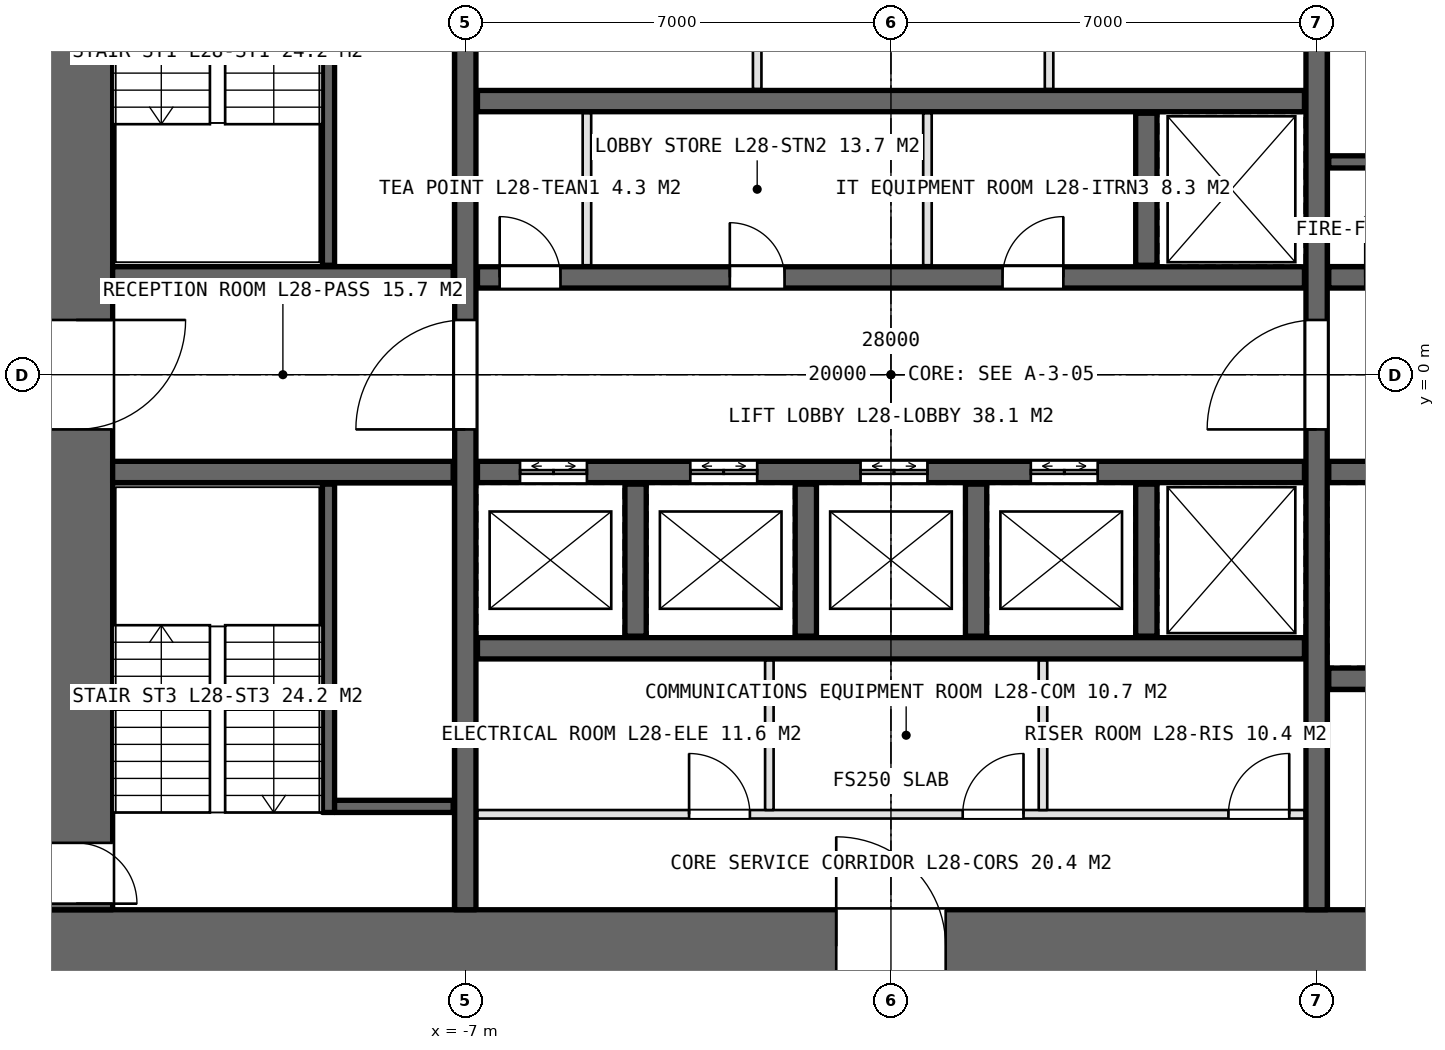
"""IFC4 building model, lengths in metres.
Left out: names, types, materials, properties, quantities, classifications, styles, units other than length and angle.
Written with IfcOpenShell. Run it as: python <this file> out.ifc"""

import sys

from ifc_helpers import new_model, si_unit, direction, frame, frame_2d, origin, place, context, subcontext, project, spatial, rectangle, extrude, element, fill, save


model = new_model("IFC4")
c1 = context("Model", 3, precision=1e-05, world=origin(), true_north=direction((0.0, 1.0)))
c2 = subcontext(c1, "Body", "Model", "MODEL_VIEW")
j1 = project(units=[si_unit("LENGTHUNIT", "METRE"), si_unit("PLANEANGLEUNIT", "RADIAN")], contexts=[c1])
p1 = place(None, origin())
s1 = spatial("IfcSite", under=j1, at=p1, CompositionType="ELEMENT")
p2 = place(p1, origin())
s2 = spatial("IfcBuilding", under=s1, at=p2, CompositionType="ELEMENT")
p3 = place(p2, frame((0.0, 0.0, 134.4)))
s3 = spatial("IfcBuildingStorey", under=s2, at=p3, CompositionType="ELEMENT", Elevation=134.4)
p4 = place(p3, frame((-14.0, -9.4, 0.0), z_axis=(0.0, 0.0, 1.0), x_axis=(1.0, 0.0, 0.0)))
e1 = element("IfcWall", 1, at=p4, inside=s3, PredefinedType="SHEAR", context=c2, shape_type="SweptSolid", body=[
    extrude(rectangle(XDim=28.0, YDim=1.2, at=frame_2d((14.0, 0.0))), origin(), (0.0, 0.0, 1.0), 4.2),
])
p5 = place(p4, frame((13.1, 0.0, 0.0)))
e2 = element("IfcOpeningElement", 2, at=p5, cuts=e1, PredefinedType="OPENING", context=c2, shape_type="SweptSolid", body=[
    extrude(rectangle(XDim=1.8, YDim=2.4, at=frame_2d((0.9, 1.2))), frame((0.0, 0.61, 0.0), z_axis=(0.0, -1.0, 0.0), x_axis=(1.0, 0.0, 0.0)), (0.0, 0.0, 1.0), 1.22),
])
p6 = place(p4, frame((22.9, 0.0, 0.0)))
e3 = element("IfcOpeningElement", 3, at=p6, cuts=e1, PredefinedType="OPENING", context=c2, shape_type="SweptSolid", body=[
    extrude(rectangle(XDim=2.2, YDim=2.7, at=frame_2d((1.1, 1.35))), frame((0.0, 0.61, 0.0), z_axis=(0.0, -1.0, 0.0), x_axis=(1.0, 0.0, 0.0)), (0.0, 0.0, 1.0), 1.22),
])
p7 = place(p3, frame((-13.4, 8.8, 0.0), z_axis=(0.0, 0.0, 1.0), x_axis=(0.0, -1.0, 0.0)))
e4 = element("IfcWall", 4, at=p7, inside=s3, PredefinedType="SHEAR", context=c2, shape_type="SweptSolid", body=[
    extrude(rectangle(XDim=17.6, YDim=1.2, at=frame_2d((8.8, 0.0))), origin(), (0.0, 0.0, 1.0), 4.2),
])
p8 = place(p7, frame((7.9, 0.0, 0.0)))
e5 = element("IfcOpeningElement", 5, at=p8, cuts=e4, PredefinedType="OPENING", context=c2, shape_type="SweptSolid", body=[
    extrude(rectangle(XDim=1.8, YDim=2.4, at=frame_2d((0.9, 1.2))), frame((0.0, 0.61, 0.0), z_axis=(0.0, -1.0, 0.0), x_axis=(1.0, 0.0, 0.0)), (0.0, 0.0, 1.0), 1.22),
])
p9 = place(p7, frame((16.5, 0.0, 0.0)))
e6 = element("IfcOpeningElement", 6, at=p9, cuts=e4, PredefinedType="OPENING", context=c2, shape_type="SweptSolid", body=[
    extrude(rectangle(XDim=1.0, YDim=2.4, at=frame_2d((0.5, 1.2))), frame((0.0, 0.61, 0.0), z_axis=(0.0, -1.0, 0.0), x_axis=(1.0, 0.0, 0.0)), (0.0, 0.0, 1.0), 1.22),
])
p10 = place(p3, frame((-7.0, -8.8, 0.0), z_axis=(0.0, 0.0, 1.0), x_axis=(0.0, 1.0, 0.0)))
e7 = element("IfcWall", 7, at=p10, inside=s3, PredefinedType="SHEAR", context=c2, shape_type="SweptSolid", body=[
    extrude(rectangle(XDim=17.6, YDim=0.35, at=frame_2d((8.8, 0.0))), origin(), (0.0, 0.0, 1.0), 4.2),
])
p11 = place(p10, frame((7.9, 0.0, 0.0)))
e8 = element("IfcOpeningElement", 8, at=p11, cuts=e7, PredefinedType="OPENING", context=c2, shape_type="SweptSolid", body=[
    extrude(rectangle(XDim=1.8, YDim=2.4, at=frame_2d((0.9, 1.2))), frame((0.0, 0.185, 0.0), z_axis=(0.0, -1.0, 0.0), x_axis=(1.0, 0.0, 0.0)), (0.0, 0.0, 1.0), 0.37),
])
p12 = place(p3, frame((7.0, -8.8, 0.0), z_axis=(0.0, 0.0, 1.0), x_axis=(0.0, 1.0, 0.0)))
e9 = element("IfcWall", 9, at=p12, inside=s3, PredefinedType="SHEAR", context=c2, shape_type="SweptSolid", body=[
    extrude(rectangle(XDim=17.6, YDim=0.35, at=frame_2d((8.8, 0.0))), origin(), (0.0, 0.0, 1.0), 4.2),
])
p13 = place(p12, frame((7.9, 0.0, 0.0)))
e10 = element("IfcOpeningElement", 10, at=p13, cuts=e9, PredefinedType="OPENING", context=c2, shape_type="SweptSolid", body=[
    extrude(rectangle(XDim=1.8, YDim=2.4, at=frame_2d((0.9, 1.2))), frame((0.0, 0.185, 0.0), z_axis=(0.0, -1.0, 0.0), x_axis=(1.0, 0.0, 0.0)), (0.0, 0.0, 1.0), 0.37),
])
p14 = place(p3, frame((-6.8, 1.6, 0.0), z_axis=(0.0, 0.0, 1.0), x_axis=(1.0, 0.0, 0.0)))
e11 = element("IfcWall", 11, at=p14, inside=s3, PredefinedType="SHEAR", context=c2, shape_type="SweptSolid", body=[
    extrude(rectangle(XDim=13.6, YDim=0.35, at=frame_2d((6.8, 0.0))), origin(), (0.0, 0.0, 1.0), 4.2),
])
p15 = place(p14, frame((0.365, 0.0, 0.0)))
e12 = element("IfcOpeningElement", 12, at=p15, cuts=e11, PredefinedType="OPENING", context=c2, shape_type="SweptSolid", body=[
    extrude(rectangle(XDim=1.0, YDim=2.4, at=frame_2d((0.5, 1.2))), frame((0.0, 0.185, 0.0), z_axis=(0.0, -1.0, 0.0), x_axis=(1.0, 0.0, 0.0)), (0.0, 0.0, 1.0), 0.37),
])
p16 = place(p14, frame((4.15, 0.0, 0.0)))
e13 = element("IfcOpeningElement", 13, at=p16, cuts=e11, PredefinedType="OPENING", context=c2, shape_type="SweptSolid", body=[
    extrude(rectangle(XDim=0.9, YDim=2.4, at=frame_2d((0.45, 1.2))), frame((0.0, 0.185, 0.0), z_axis=(0.0, -1.0, 0.0), x_axis=(1.0, 0.0, 0.0)), (0.0, 0.0, 1.0), 0.37),
])
p17 = place(p14, frame((8.635, 0.0, 0.0)))
e14 = element("IfcOpeningElement", 14, at=p17, cuts=e11, PredefinedType="OPENING", context=c2, shape_type="SweptSolid", body=[
    extrude(rectangle(XDim=1.0, YDim=2.4, at=frame_2d((0.5, 1.2))), frame((0.0, 0.185, 0.0), z_axis=(0.0, -1.0, 0.0), x_axis=(1.0, 0.0, 0.0)), (0.0, 0.0, 1.0), 0.37),
])
p18 = place(p3, frame((-6.8, -1.6, 0.0), z_axis=(0.0, 0.0, 1.0), x_axis=(1.0, 0.0, 0.0)))
e15 = element("IfcWall", 15, at=p18, inside=s3, PredefinedType="SHEAR", context=c2, shape_type="SweptSolid", body=[
    extrude(rectangle(XDim=13.6, YDim=0.35, at=frame_2d((6.8, 0.0))), origin(), (0.0, 0.0, 1.0), 4.2),
])
p19 = place(p18, frame((0.7, 0.0, 0.0)))
e16 = element("IfcOpeningElement", 16, at=p19, cuts=e15, PredefinedType="OPENING", context=c2, shape_type="SweptSolid", body=[
    extrude(rectangle(XDim=1.1, YDim=2.4, at=frame_2d((0.55, 1.2))), frame((0.0, 0.185, 0.0), z_axis=(0.0, -1.0, 0.0), x_axis=(1.0, 0.0, 0.0)), (0.0, 0.0, 1.0), 0.37),
])
p20 = place(p18, frame((3.5, 0.0, 0.0)))
e17 = element("IfcOpeningElement", 17, at=p20, cuts=e15, PredefinedType="OPENING", context=c2, shape_type="SweptSolid", body=[
    extrude(rectangle(XDim=1.1, YDim=2.4, at=frame_2d((0.55, 1.2))), frame((0.0, 0.185, 0.0), z_axis=(0.0, -1.0, 0.0), x_axis=(1.0, 0.0, 0.0)), (0.0, 0.0, 1.0), 0.37),
])
p21 = place(p18, frame((6.3, 0.0, 0.0)))
e18 = element("IfcOpeningElement", 18, at=p21, cuts=e15, PredefinedType="OPENING", context=c2, shape_type="SweptSolid", body=[
    extrude(rectangle(XDim=1.1, YDim=2.4, at=frame_2d((0.55, 1.2))), frame((0.0, 0.185, 0.0), z_axis=(0.0, -1.0, 0.0), x_axis=(1.0, 0.0, 0.0)), (0.0, 0.0, 1.0), 0.37),
])
p22 = place(p18, frame((9.1, 0.0, 0.0)))
e19 = element("IfcOpeningElement", 19, at=p22, cuts=e15, PredefinedType="OPENING", context=c2, shape_type="SweptSolid", body=[
    extrude(rectangle(XDim=1.1, YDim=2.4, at=frame_2d((0.55, 1.2))), frame((0.0, 0.185, 0.0), z_axis=(0.0, -1.0, 0.0), x_axis=(1.0, 0.0, 0.0)), (0.0, 0.0, 1.0), 0.37),
])
for number, where, z_axis, x_axis in (
    (20, (-6.8, 4.5, 0.0), (0.0, 0.0, 1.0), (1.0, 0.0, 0.0)),
    (21, (-6.8, -4.5, 0.0), (0.0, 0.0, 1.0), (1.0, 0.0, 0.0)),
):
    element("IfcWall", number, at=place(p3, frame(where, z_axis=z_axis, x_axis=x_axis)), inside=s3, PredefinedType="SHEAR", context=c2, shape_type="SweptSolid", body=[
        extrude(rectangle(XDim=13.6, YDim=0.35, at=frame_2d((6.8, 0.0))), origin(), (0.0, 0.0, 1.0), 4.2),
    ])
for number, where, z_axis, x_axis in (
    (22, (-12.8, 1.6, 0.0), (0.0, 0.0, 1.0), (1.0, 0.0, 0.0)),
    (23, (-12.8, -1.6, 0.0), (0.0, 0.0, 1.0), (1.0, 0.0, 0.0)),
):
    element("IfcWall", number, at=place(p3, frame(where, z_axis=z_axis, x_axis=x_axis)), inside=s3, PredefinedType="SHEAR", context=c2, shape_type="SweptSolid", body=[
        extrude(rectangle(XDim=5.6, YDim=0.35, at=frame_2d((2.8, 0.0))), origin(), (0.0, 0.0, 1.0), 4.2),
    ])
p23 = place(p3, frame((7.2, 1.6, 0.0), z_axis=(0.0, 0.0, 1.0), x_axis=(1.0, 0.0, 0.0)))
e24 = element("IfcWall", 24, at=p23, inside=s3, PredefinedType="SHEAR", context=c2, shape_type="SweptSolid", body=[
    extrude(rectangle(XDim=5.6, YDim=0.35, at=frame_2d((2.8, 0.0))), origin(), (0.0, 0.0, 1.0), 4.2),
])
p24 = place(p23, frame((0.6, 0.0, 0.0)))
e25 = element("IfcOpeningElement", 25, at=p24, cuts=e24, PredefinedType="OPENING", context=c2, shape_type="SweptSolid", body=[
    extrude(rectangle(XDim=1.0, YDim=2.4, at=frame_2d((0.5, 1.2))), frame((0.0, 0.185, 0.0), z_axis=(0.0, -1.0, 0.0), x_axis=(1.0, 0.0, 0.0)), (0.0, 0.0, 1.0), 0.37),
])
p25 = place(p3, frame((7.2, -1.6, 0.0), z_axis=(0.0, 0.0, 1.0), x_axis=(1.0, 0.0, 0.0)))
e26 = element("IfcWall", 26, at=p25, inside=s3, PredefinedType="SHEAR", context=c2, shape_type="SweptSolid", body=[
    extrude(rectangle(XDim=5.6, YDim=0.35, at=frame_2d((2.8, 0.0))), origin(), (0.0, 0.0, 1.0), 4.2),
])
p26 = place(p25, frame((0.9, 0.0, 0.0)))
e27 = element("IfcOpeningElement", 27, at=p26, cuts=e26, PredefinedType="OPENING", context=c2, shape_type="SweptSolid", body=[
    extrude(rectangle(XDim=1.3, YDim=2.4, at=frame_2d((0.65, 1.2))), frame((0.0, 0.185, 0.0), z_axis=(0.0, -1.0, 0.0), x_axis=(1.0, 0.0, 0.0)), (0.0, 0.0, 1.0), 0.37),
])
p27 = place(p25, frame((3.9, 0.0, 0.0)))
e28 = element("IfcOpeningElement", 28, at=p27, cuts=e26, PredefinedType="OPENING", context=c2, shape_type="SweptSolid", body=[
    extrude(rectangle(XDim=1.3, YDim=2.4, at=frame_2d((0.65, 1.2))), frame((0.0, 0.185, 0.0), z_axis=(0.0, -1.0, 0.0), x_axis=(1.0, 0.0, 0.0)), (0.0, 0.0, 1.0), 0.37),
])
p28 = place(p3, frame((7.2, -5.0, 0.0), z_axis=(0.0, 0.0, 1.0), x_axis=(1.0, 0.0, 0.0)))
e29 = element("IfcWall", 29, at=p28, inside=s3, PredefinedType="SHEAR", context=c2, shape_type="SweptSolid", body=[
    extrude(rectangle(XDim=5.6, YDim=0.35, at=frame_2d((2.8, 0.0))), origin(), (0.0, 0.0, 1.0), 4.2),
])
for number, where, z_axis, x_axis in (
    (30, (-4.2, -4.3, 0.0), (0.0, 0.0, 1.0), (0.0, 1.0, 0.0)),
    (31, (-1.4, -4.3, 0.0), (0.0, 0.0, 1.0), (0.0, 1.0, 0.0)),
    (32, (1.4, -4.3, 0.0), (0.0, 0.0, 1.0), (0.0, 1.0, 0.0)),
    (33, (4.2, 1.8, 0.0), (0.0, 0.0, 1.0), (0.0, 1.0, 0.0)),
    (34, (4.2, -4.3, 0.0), (0.0, 0.0, 1.0), (0.0, 1.0, 0.0)),
):
    element("IfcWall", number, at=place(p3, frame(where, z_axis=z_axis, x_axis=x_axis)), inside=s3, PredefinedType="SHEAR", context=c2, shape_type="SweptSolid", body=[
        extrude(rectangle(XDim=2.5, YDim=0.35, at=frame_2d((1.25, 0.0))), origin(), (0.0, 0.0, 1.0), 4.2),
    ])
for number, where, z_axis, x_axis in (
    (35, (-2.2, 4.7, 0.0), (0.0, 0.0, 1.0), (0.0, 1.0, 0.0)),
    (36, (2.6, 4.7, 0.0), (0.0, 0.0, 1.0), (0.0, 1.0, 0.0)),
):
    element("IfcWall", number, at=place(p3, frame(where, z_axis=z_axis, x_axis=x_axis)), inside=s3, PredefinedType="PARTITIONING", context=c2, shape_type="SweptSolid", body=[
        extrude(rectangle(XDim=2.46, YDim=0.14, at=frame_2d((1.23, 0.0))), origin(), (0.0, 0.0, 1.0), 3.95),
    ])
p29 = place(p3, frame((-6.8, -7.23, 0.0), z_axis=(0.0, 0.0, 1.0), x_axis=(1.0, 0.0, 0.0)))
e37 = element("IfcWall", 37, at=p29, inside=s3, PredefinedType="PARTITIONING", context=c2, shape_type="SweptSolid", body=[
    extrude(rectangle(XDim=13.6, YDim=0.14, at=frame_2d((6.8, 0.0))), origin(), (0.0, 0.0, 1.0), 3.95),
])
p30 = place(p29, frame((3.48, 0.0, 0.0)))
e38 = element("IfcOpeningElement", 38, at=p30, cuts=e37, PredefinedType="OPENING", context=c2, shape_type="SweptSolid", body=[
    extrude(rectangle(XDim=1.0, YDim=2.4, at=frame_2d((0.5, 1.2))), frame((0.0, 0.08, 0.0), z_axis=(0.0, -1.0, 0.0), x_axis=(1.0, 0.0, 0.0)), (0.0, 0.0, 1.0), 0.16),
])
p31 = place(p29, frame((7.98, 0.0, 0.0)))
e39 = element("IfcOpeningElement", 39, at=p31, cuts=e37, PredefinedType="OPENING", context=c2, shape_type="SweptSolid", body=[
    extrude(rectangle(XDim=1.0, YDim=2.4, at=frame_2d((0.5, 1.2))), frame((0.0, 0.08, 0.0), z_axis=(0.0, -1.0, 0.0), x_axis=(1.0, 0.0, 0.0)), (0.0, 0.0, 1.0), 0.16),
])
p32 = place(p29, frame((12.35, 0.0, 0.0)))
e40 = element("IfcOpeningElement", 40, at=p32, cuts=e37, PredefinedType="OPENING", context=c2, shape_type="SweptSolid", body=[
    extrude(rectangle(XDim=1.0, YDim=2.4, at=frame_2d((0.5, 1.2))), frame((0.0, 0.08, 0.0), z_axis=(0.0, -1.0, 0.0), x_axis=(1.0, 0.0, 0.0)), (0.0, 0.0, 1.0), 0.16),
])
for number, where, z_axis, x_axis in (
    (41, (-2.0, -4.7, 0.0), (0.0, 0.0, 1.0), (0.0, -1.0, 0.0)),
    (42, (2.5, -4.7, 0.0), (0.0, 0.0, 1.0), (0.0, -1.0, 0.0)),
):
    element("IfcWall", number, at=place(p3, frame(where, z_axis=z_axis, x_axis=x_axis)), inside=s3, PredefinedType="PARTITIONING", context=c2, shape_type="SweptSolid", body=[
        extrude(rectangle(XDim=2.46, YDim=0.14, at=frame_2d((1.23, 0.0))), origin(), (0.0, 0.0, 1.0), 3.95),
    ])
for number, where, z_axis, x_axis in (
    (43, (-5.0, 1.8, 0.0), (0.0, 0.0, 1.0), (0.0, 1.0, 0.0)),
    (44, (0.6, 1.8, 0.0), (0.0, 0.0, 1.0), (0.0, 1.0, 0.0)),
):
    element("IfcWall", number, at=place(p3, frame(where, z_axis=z_axis, x_axis=x_axis)), inside=s3, PredefinedType="PARTITIONING", context=c2, shape_type="SweptSolid", body=[
        extrude(rectangle(XDim=2.5, YDim=0.14, at=frame_2d((1.25, 0.0))), origin(), (0.0, 0.0, 1.0), 3.95),
    ])
for number, where, z_axis, x_axis in (
    (45, (-9.25, 7.2, 0.0), (0.0, 0.0, 1.0), (0.0, -1.0, 0.0)),
    (46, (-9.25, -7.2, 0.0), (0.0, 0.0, 1.0), (0.0, 1.0, 0.0)),
):
    element("IfcWall", number, at=place(p3, frame(where, z_axis=z_axis, x_axis=x_axis)), inside=s3, PredefinedType="SOLIDWALL", context=c2, shape_type="SweptSolid", body=[
        extrude(rectangle(XDim=5.4, YDim=0.2, at=frame_2d((2.7, 0.0))), origin(), (0.0, 0.0, 1.0), 4.2),
    ])
for number, where, z_axis, x_axis in (
    (47, (-9.15, -7.1, 0.0), (0.0, 0.0, 1.0), (1.0, 0.0, 0.0)),
    (48, (9.15, 3.5, 0.0), (0.0, 0.0, 1.0), (-1.0, 0.0, 0.0)),
):
    element("IfcWall", number, at=place(p3, frame(where, z_axis=z_axis, x_axis=x_axis)), inside=s3, PredefinedType="SOLIDWALL", context=c2, shape_type="SweptSolid", body=[
        extrude(rectangle(XDim=1.95, YDim=0.2, at=frame_2d((0.975, 0.0))), origin(), (0.0, 0.0, 1.0), 4.2),
    ])
p33 = place(p8, origin())
e49 = element("IfcDoor", 49, at=p33, inside=s3, OperationType="DOUBLE_DOOR_SINGLE_SWING", PredefinedType="DOOR", context=c2, shape_type="SweptSolid", body=[
    extrude(rectangle(XDim=1.8, YDim=2.4, at=frame_2d((0.9, 1.2))), frame((0.0, 0.025, 0.0), z_axis=(0.0, -1.0, 0.0), x_axis=(1.0, 0.0, 0.0)), (0.0, 0.0, 1.0), 0.05),
])
fill(e5, e49)
p34 = place(p11, origin())
e50 = element("IfcDoor", 50, at=p34, inside=s3, OperationType="DOUBLE_DOOR_SINGLE_SWING", PredefinedType="DOOR", context=c2, shape_type="SweptSolid", body=[
    extrude(rectangle(XDim=1.8, YDim=2.4, at=frame_2d((0.9, 1.2))), frame((0.0, 0.025, 0.0), z_axis=(0.0, -1.0, 0.0), x_axis=(1.0, 0.0, 0.0)), (0.0, 0.0, 1.0), 0.05),
])
fill(e8, e50)
p35 = place(p13, origin())
e51 = element("IfcDoor", 51, at=p35, inside=s3, OperationType="DOUBLE_DOOR_SINGLE_SWING", PredefinedType="DOOR", context=c2, shape_type="SweptSolid", body=[
    extrude(rectangle(XDim=1.8, YDim=2.4, at=frame_2d((0.9, 1.2))), frame((0.0, 0.025, 0.0), z_axis=(0.0, -1.0, 0.0), x_axis=(1.0, 0.0, 0.0)), (0.0, 0.0, 1.0), 0.05),
])
fill(e10, e51)
p36 = place(p9, origin())
e52 = element("IfcDoor", 52, at=p36, inside=s3, OperationType="SINGLE_SWING_RIGHT", PredefinedType="DOOR", context=c2, shape_type="SweptSolid", body=[
    extrude(rectangle(XDim=1.0, YDim=2.4, at=frame_2d((0.5, 1.2))), frame((0.0, 0.025, 0.0), z_axis=(0.0, -1.0, 0.0), x_axis=(1.0, 0.0, 0.0)), (0.0, 0.0, 1.0), 0.05),
])
fill(e6, e52)
p37 = place(p30, origin())
e53 = element("IfcDoor", 53, at=p37, inside=s3, OperationType="SINGLE_SWING_LEFT", PredefinedType="DOOR", context=c2, shape_type="SweptSolid", body=[
    extrude(rectangle(XDim=1.0, YDim=2.4, at=frame_2d((0.5, 1.2))), frame((0.0, 0.025, 0.0), z_axis=(0.0, -1.0, 0.0), x_axis=(1.0, 0.0, 0.0)), (0.0, 0.0, 1.0), 0.05),
])
fill(e38, e53)
p38 = place(p31, origin())
e54 = element("IfcDoor", 54, at=p38, inside=s3, OperationType="SINGLE_SWING_RIGHT", PredefinedType="DOOR", context=c2, shape_type="SweptSolid", body=[
    extrude(rectangle(XDim=1.0, YDim=2.4, at=frame_2d((0.5, 1.2))), frame((0.0, 0.025, 0.0), z_axis=(0.0, -1.0, 0.0), x_axis=(1.0, 0.0, 0.0)), (0.0, 0.0, 1.0), 0.05),
])
fill(e39, e54)
p39 = place(p32, origin())
e55 = element("IfcDoor", 55, at=p39, inside=s3, OperationType="SINGLE_SWING_RIGHT", PredefinedType="DOOR", context=c2, shape_type="SweptSolid", body=[
    extrude(rectangle(XDim=1.0, YDim=2.4, at=frame_2d((0.5, 1.2))), frame((0.0, 0.025, 0.0), z_axis=(0.0, -1.0, 0.0), x_axis=(1.0, 0.0, 0.0)), (0.0, 0.0, 1.0), 0.05),
])
fill(e40, e55)
p40 = place(p15, origin())
e56 = element("IfcDoor", 56, at=p40, inside=s3, OperationType="SINGLE_SWING_LEFT", PredefinedType="DOOR", context=c2, shape_type="SweptSolid", body=[
    extrude(rectangle(XDim=1.0, YDim=2.4, at=frame_2d((0.5, 1.2))), frame((0.0, 0.025, 0.0), z_axis=(0.0, -1.0, 0.0), x_axis=(1.0, 0.0, 0.0)), (0.0, 0.0, 1.0), 0.05),
])
fill(e12, e56)
p41 = place(p16, origin())
e57 = element("IfcDoor", 57, at=p41, inside=s3, OperationType="SINGLE_SWING_LEFT", PredefinedType="DOOR", context=c2, shape_type="SweptSolid", body=[
    extrude(rectangle(XDim=0.9, YDim=2.4, at=frame_2d((0.45, 1.2))), frame((0.0, 0.025, 0.0), z_axis=(0.0, -1.0, 0.0), x_axis=(1.0, 0.0, 0.0)), (0.0, 0.0, 1.0), 0.05),
])
fill(e13, e57)
p42 = place(p17, origin())
e58 = element("IfcDoor", 58, at=p42, inside=s3, OperationType="SINGLE_SWING_RIGHT", PredefinedType="DOOR", context=c2, shape_type="SweptSolid", body=[
    extrude(rectangle(XDim=1.0, YDim=2.4, at=frame_2d((0.5, 1.2))), frame((0.0, 0.025, 0.0), z_axis=(0.0, -1.0, 0.0), x_axis=(1.0, 0.0, 0.0)), (0.0, 0.0, 1.0), 0.05),
])
fill(e14, e58)
p43 = place(p5, origin())
e59 = element("IfcDoor", 59, at=p43, inside=s3, OperationType="DOUBLE_DOOR_SINGLE_SWING", PredefinedType="DOOR", context=c2, shape_type="SweptSolid", body=[
    extrude(rectangle(XDim=1.8, YDim=2.4, at=frame_2d((0.9, 1.2))), frame((0.0, 0.025, 0.0), z_axis=(0.0, -1.0, 0.0), x_axis=(1.0, 0.0, 0.0)), (0.0, 0.0, 1.0), 0.05),
])
fill(e2, e59)
p44 = place(p19, origin())
e60 = element("IfcDoor", 60, at=p44, inside=s3, OperationType="DOUBLE_DOOR_SLIDING", PredefinedType="DOOR", context=c2, shape_type="SweptSolid", body=[
    extrude(rectangle(XDim=1.1, YDim=2.4, at=frame_2d((0.55, 1.2))), frame((0.0, 0.025, 0.0), z_axis=(0.0, -1.0, 0.0), x_axis=(1.0, 0.0, 0.0)), (0.0, 0.0, 1.0), 0.05),
])
fill(e16, e60)
p45 = place(p20, origin())
e61 = element("IfcDoor", 61, at=p45, inside=s3, OperationType="DOUBLE_DOOR_SLIDING", PredefinedType="DOOR", context=c2, shape_type="SweptSolid", body=[
    extrude(rectangle(XDim=1.1, YDim=2.4, at=frame_2d((0.55, 1.2))), frame((0.0, 0.025, 0.0), z_axis=(0.0, -1.0, 0.0), x_axis=(1.0, 0.0, 0.0)), (0.0, 0.0, 1.0), 0.05),
])
fill(e17, e61)
p46 = place(p21, origin())
e62 = element("IfcDoor", 62, at=p46, inside=s3, OperationType="DOUBLE_DOOR_SLIDING", PredefinedType="DOOR", context=c2, shape_type="SweptSolid", body=[
    extrude(rectangle(XDim=1.1, YDim=2.4, at=frame_2d((0.55, 1.2))), frame((0.0, 0.025, 0.0), z_axis=(0.0, -1.0, 0.0), x_axis=(1.0, 0.0, 0.0)), (0.0, 0.0, 1.0), 0.05),
])
fill(e18, e62)
p47 = place(p22, origin())
e63 = element("IfcDoor", 63, at=p47, inside=s3, OperationType="DOUBLE_DOOR_SLIDING", PredefinedType="DOOR", context=c2, shape_type="SweptSolid", body=[
    extrude(rectangle(XDim=1.1, YDim=2.4, at=frame_2d((0.55, 1.2))), frame((0.0, 0.025, 0.0), z_axis=(0.0, -1.0, 0.0), x_axis=(1.0, 0.0, 0.0)), (0.0, 0.0, 1.0), 0.05),
])
fill(e19, e63)
save(model, sys.argv[1])
